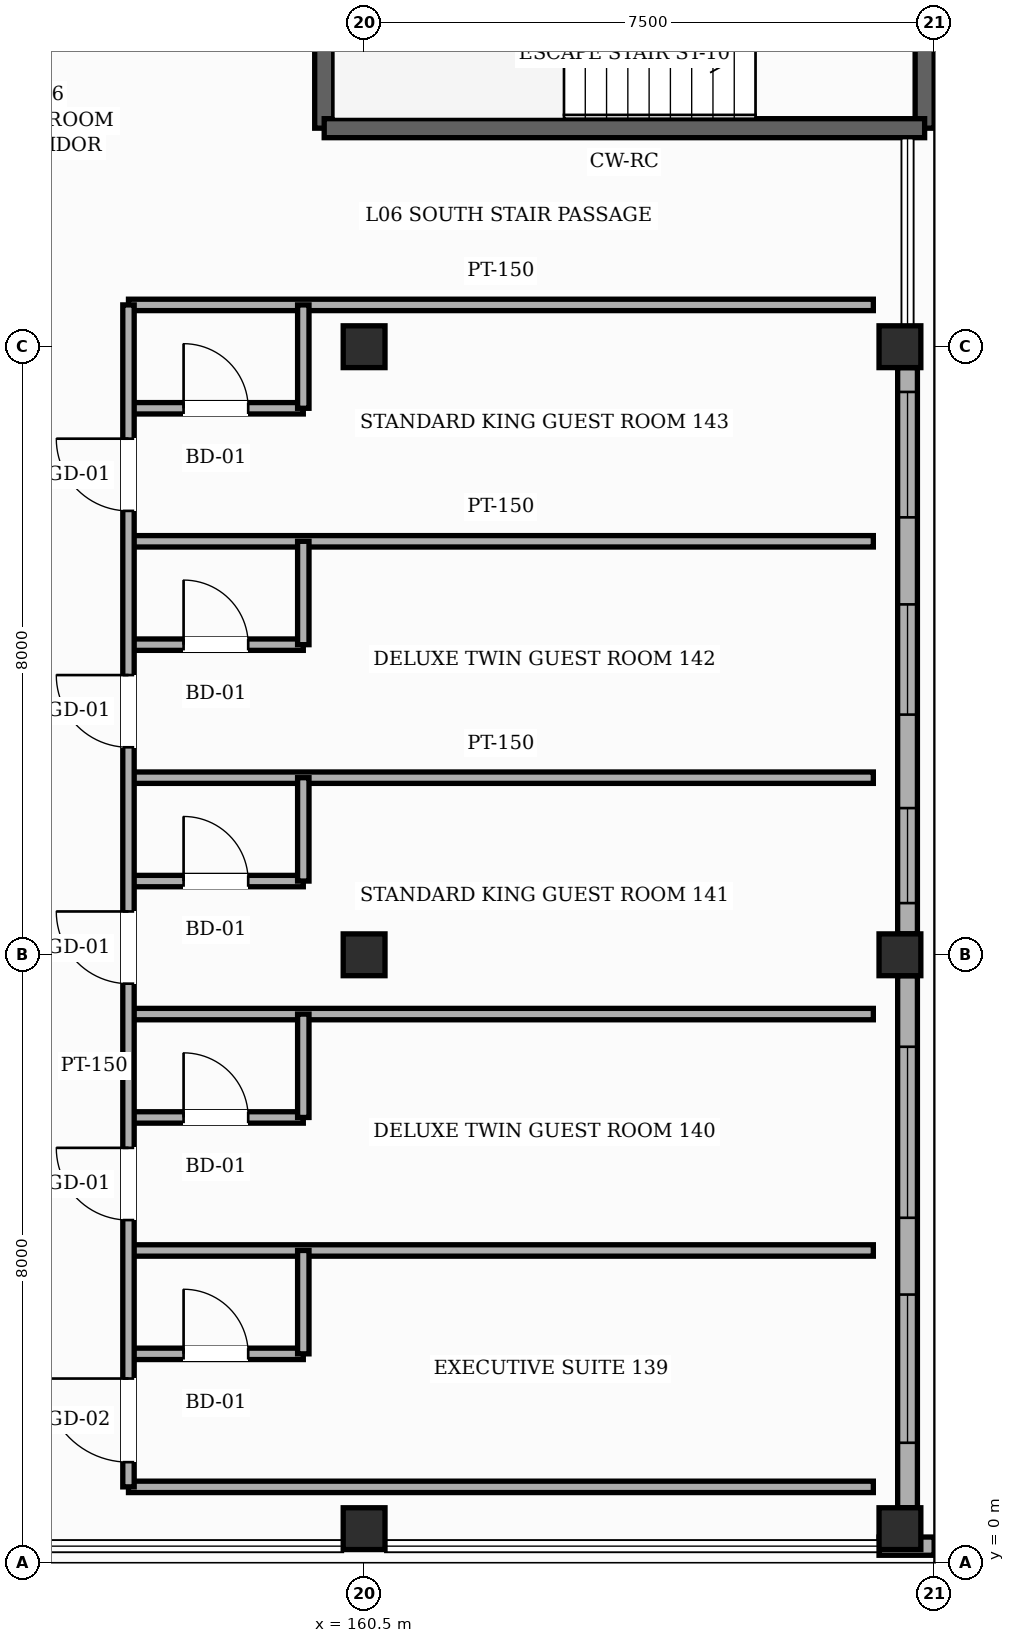
"""IFC4 building model, lengths in metres.
Left out: names, types, materials, properties, quantities, classifications, styles, units other than length and angle.
Written with IfcOpenShell. Run it as: python <this file> out.ifc"""

import sys

from ifc_helpers import new_model, si_unit, direction, frame, frame_2d, origin, origin_2d, place, context, subcontext, project, spatial, rectangle, hollow_rectangle, extrude, element, fill, save


model = new_model("IFC4")
c1 = context("Model", 3, precision=1e-05, world=origin(), true_north=direction((0.0, 1.0)))
c2 = subcontext(c1, "Body", "Model", "MODEL_VIEW")
j1 = project(units=[si_unit("LENGTHUNIT", "METRE"), si_unit("PLANEANGLEUNIT", "RADIAN")], contexts=[c1])
p1 = place(None, origin())
s1 = spatial("IfcSite", under=j1, at=p1, CompositionType="ELEMENT")
p2 = place(p1, origin())
s2 = spatial("IfcBuilding", under=s1, at=p2, CompositionType="ELEMENT")
p3 = place(p2, frame((0.0, 0.0, 28.2)))
s3 = spatial("IfcBuildingStorey", under=s2, at=p3, CompositionType="ELEMENT", Elevation=28.2)
p4 = place(p3, frame((160.5, 0.45, 0.0), z_axis=(0.0, 0.0, 1.0), x_axis=(1.0, 0.0, 0.0)))
e1 = element("IfcColumn", 1, at=p4, inside=s3, PredefinedType="COLUMN", context=c2, shape_type="SweptSolid", body=[
    extrude(hollow_rectangle(XDim=0.55, YDim=0.55, WallThickness=0.022, InnerFilletRadius=0.022, OuterFilletRadius=0.044, at=origin_2d()), origin(), (0.0, 0.0, 1.0), 3.38),
])
for number, where, z_axis, x_axis in (
    (2, (160.5, 8.0, 0.0), (0.0, 0.0, 1.0), (1.0, 0.0, 0.0)),
    (3, (160.5, 16.0, 0.0), (0.0, 0.0, 1.0), (1.0, 0.0, 0.0)),
):
    element("IfcColumn", number, at=place(p3, frame(where, z_axis=z_axis, x_axis=x_axis)), inside=s3, PredefinedType="COLUMN", context=c2, shape_type="SweptSolid", body=[
        extrude(hollow_rectangle(XDim=0.55, YDim=0.55, WallThickness=0.022, InnerFilletRadius=0.022, OuterFilletRadius=0.044, at=origin_2d()), origin(), (0.0, 0.0, 1.0), 3.6),
    ])
p5 = place(p3, frame((167.55, 0.45, 0.0), z_axis=(0.0, 0.0, 1.0), x_axis=(1.0, 0.0, 0.0)))
e4 = element("IfcColumn", 4, at=p5, inside=s3, PredefinedType="COLUMN", context=c2, shape_type="SweptSolid", body=[
    extrude(hollow_rectangle(XDim=0.55, YDim=0.55, WallThickness=0.022, InnerFilletRadius=0.022, OuterFilletRadius=0.044, at=origin_2d()), origin(), (0.0, 0.0, 1.0), 3.38),
])
for number, where, z_axis, x_axis in (
    (5, (167.55, 8.0, 0.0), (0.0, 0.0, 1.0), (1.0, 0.0, 0.0)),
    (6, (167.55, 16.0, 0.0), (0.0, 0.0, 1.0), (1.0, 0.0, 0.0)),
):
    element("IfcColumn", number, at=place(p3, frame(where, z_axis=z_axis, x_axis=x_axis)), inside=s3, PredefinedType="COLUMN", context=c2, shape_type="SweptSolid", body=[
        extrude(hollow_rectangle(XDim=0.55, YDim=0.55, WallThickness=0.022, InnerFilletRadius=0.022, OuterFilletRadius=0.044, at=origin_2d()), origin(), (0.0, 0.0, 1.0), 3.6),
    ])
p6 = place(p3, frame((167.65, 7.725, 0.0), z_axis=(0.0, 0.0, 1.0), x_axis=(0.0, -1.0, 0.0)))
e7 = element("IfcWall", 7, at=p6, inside=s3, PredefinedType="SOLIDWALL", context=c2, shape_type="SweptSolid", body=[
    extrude(rectangle(XDim=7.0, YDim=0.26, at=frame_2d((3.5, 0.0))), origin(), (0.0, 0.0, 1.0), 2.755),
])
p7 = place(p6, frame((4.195, 0.0, 0.85)))
e8 = element("IfcOpeningElement", 8, at=p7, cuts=e7, PredefinedType="OPENING", context=c2, shape_type="SweptSolid", body=[
    extrude(rectangle(XDim=1.95, YDim=1.35, at=frame_2d((0.975, 0.675))), frame((0.0, 0.14, 0.0), z_axis=(0.0, -1.0, 0.0), x_axis=(1.0, 0.0, 0.0)), (0.0, 0.0, 1.0), 0.28),
])
p8 = place(p6, frame((0.935, 0.0, 0.85)))
e9 = element("IfcOpeningElement", 9, at=p8, cuts=e7, PredefinedType="OPENING", context=c2, shape_type="SweptSolid", body=[
    extrude(rectangle(XDim=2.25, YDim=1.35, at=frame_2d((1.125, 0.675))), frame((0.0, 0.14, 0.0), z_axis=(0.0, -1.0, 0.0), x_axis=(1.0, 0.0, 0.0)), (0.0, 0.0, 1.0), 0.28),
])
p9 = place(p3, frame((167.65, 15.725, 0.0), z_axis=(0.0, 0.0, 1.0), x_axis=(0.0, -1.0, 0.0)))
e10 = element("IfcWall", 10, at=p9, inside=s3, PredefinedType="SOLIDWALL", context=c2, shape_type="SweptSolid", body=[
    extrude(rectangle(XDim=7.45, YDim=0.26, at=frame_2d((3.725, 0.0))), origin(), (0.0, 0.0, 1.0), 2.755),
])
p10 = place(p9, frame((5.795, 0.0, 0.85)))
e11 = element("IfcOpeningElement", 11, at=p10, cuts=e10, PredefinedType="OPENING", context=c2, shape_type="SweptSolid", body=[
    extrude(rectangle(XDim=1.25, YDim=1.35, at=frame_2d((0.625, 0.675))), frame((0.0, 0.14, 0.0), z_axis=(0.0, -1.0, 0.0), x_axis=(1.0, 0.0, 0.0)), (0.0, 0.0, 1.0), 0.28),
])
p11 = place(p9, frame((3.115, 0.0, 0.85)))
e12 = element("IfcOpeningElement", 12, at=p11, cuts=e10, PredefinedType="OPENING", context=c2, shape_type="SweptSolid", body=[
    extrude(rectangle(XDim=1.45, YDim=1.35, at=frame_2d((0.725, 0.675))), frame((0.0, 0.14, 0.0), z_axis=(0.0, -1.0, 0.0), x_axis=(1.0, 0.0, 0.0)), (0.0, 0.0, 1.0), 0.28),
])
p12 = place(p9, frame((0.32, 0.0, 0.85)))
e13 = element("IfcOpeningElement", 13, at=p12, cuts=e10, PredefinedType="OPENING", context=c2, shape_type="SweptSolid", body=[
    extrude(rectangle(XDim=1.65, YDim=1.35, at=frame_2d((0.825, 0.675))), frame((0.0, 0.14, 0.0), z_axis=(0.0, -1.0, 0.0), x_axis=(1.0, 0.0, 0.0)), (0.0, 0.0, 1.0), 0.28),
])
p13 = place(p3, frame((168.0, 0.22, 0.0), z_axis=(0.0, 0.0, 1.0), x_axis=(-1.0, 0.0, 0.0)))
e14 = element("IfcWall", 14, at=p13, inside=s3, PredefinedType="SOLIDWALL", context=c2, shape_type="SweptSolid", body=[
    extrude(rectangle(XDim=0.725, YDim=0.24, at=frame_2d((0.363, 0.0))), origin(), (0.0, 0.0, 1.0), 3.365),
])
for number, where, z_axis, x_axis in (
    (15, (167.875, 22.225, 0.0), (0.0, 0.0, 1.0), (0.0, -1.0, 0.0)),
    (16, (159.975, 18.875, 0.0), (0.0, 0.0, 1.0), (0.0, 1.0, 0.0)),
):
    element("IfcWall", number, at=place(p3, frame(where, z_axis=z_axis, x_axis=x_axis)), inside=s3, PredefinedType="SHEAR", context=c2, shape_type="SweptSolid", body=[
        extrude(rectangle(XDim=3.35, YDim=0.25, at=frame_2d((1.675, 0.0))), origin(), (0.0, 0.0, 1.0), 3.38),
    ])
p14 = place(p3, frame((167.875, 18.875, 0.0), z_axis=(0.0, 0.0, 1.0), x_axis=(-1.0, 0.0, 0.0)))
e17 = element("IfcWall", 17, at=p14, inside=s3, PredefinedType="SHEAR", context=c2, shape_type="SweptSolid", body=[
    extrude(rectangle(XDim=7.9, YDim=0.25, at=frame_2d((3.95, 0.0))), origin(), (0.0, 0.0, 1.0), 3.38),
])
p15 = place(p3, frame((157.4, 1.0, 0.0), z_axis=(0.0, 0.0, 1.0), x_axis=(1.0, 0.0, 0.0)))
e18 = element("IfcWall", 18, at=p15, inside=s3, PredefinedType="PARTITIONING", context=c2, shape_type="SweptSolid", body=[
    extrude(rectangle(XDim=9.8, YDim=0.15, at=frame_2d((4.9, 0.0))), origin(), (0.0, 0.0, 1.0), 3.365),
])
p16 = place(p3, frame((157.4, 2.75, 0.0), z_axis=(0.0, 0.0, 1.0), x_axis=(1.0, 0.0, 0.0)))
e19 = element("IfcWall", 19, at=p16, inside=s3, PredefinedType="PARTITIONING", context=c2, shape_type="SweptSolid", body=[
    extrude(rectangle(XDim=2.3, YDim=0.15, at=frame_2d((1.15, 0.0))), origin(), (0.0, 0.0, 1.0), 3.365),
])
p17 = place(p16, frame((0.725, 0.0, 0.0)))
e20 = element("IfcOpeningElement", 20, at=p17, cuts=e19, PredefinedType="OPENING", context=c2, shape_type="SweptSolid", body=[
    extrude(rectangle(XDim=0.85, YDim=2.1, at=frame_2d((0.425, 1.05))), frame((0.0, 0.085, 0.0), z_axis=(0.0, -1.0, 0.0), x_axis=(1.0, 0.0, 0.0)), (0.0, 0.0, 1.0), 0.17),
])
p18 = place(p3, frame((157.4, 4.11, 0.0), z_axis=(0.0, 0.0, 1.0), x_axis=(1.0, 0.0, 0.0)))
e21 = element("IfcWall", 21, at=p18, inside=s3, PredefinedType="PARTITIONING", context=c2, shape_type="SweptSolid", body=[
    extrude(rectangle(XDim=9.8, YDim=0.15, at=frame_2d((4.9, 0.0))), origin(), (0.0, 0.0, 1.0), 3.005),
])
p19 = place(p3, frame((157.4, 5.86, 0.0), z_axis=(0.0, 0.0, 1.0), x_axis=(1.0, 0.0, 0.0)))
e22 = element("IfcWall", 22, at=p19, inside=s3, PredefinedType="PARTITIONING", context=c2, shape_type="SweptSolid", body=[
    extrude(rectangle(XDim=2.3, YDim=0.15, at=frame_2d((1.15, 0.0))), origin(), (0.0, 0.0, 1.0), 3.365),
])
p20 = place(p19, frame((0.725, 0.0, 0.0)))
e23 = element("IfcOpeningElement", 23, at=p20, cuts=e22, PredefinedType="OPENING", context=c2, shape_type="SweptSolid", body=[
    extrude(rectangle(XDim=0.85, YDim=2.1, at=frame_2d((0.425, 1.05))), frame((0.0, 0.085, 0.0), z_axis=(0.0, -1.0, 0.0), x_axis=(1.0, 0.0, 0.0)), (0.0, 0.0, 1.0), 0.17),
])
p21 = place(p3, frame((157.4, 7.22, 0.0), z_axis=(0.0, 0.0, 1.0), x_axis=(1.0, 0.0, 0.0)))
e24 = element("IfcWall", 24, at=p21, inside=s3, PredefinedType="PARTITIONING", context=c2, shape_type="SweptSolid", body=[
    extrude(rectangle(XDim=9.8, YDim=0.15, at=frame_2d((4.9, 0.0))), origin(), (0.0, 0.0, 1.0), 3.365),
])
p22 = place(p3, frame((157.4, 8.97, 0.0), z_axis=(0.0, 0.0, 1.0), x_axis=(1.0, 0.0, 0.0)))
e25 = element("IfcWall", 25, at=p22, inside=s3, PredefinedType="PARTITIONING", context=c2, shape_type="SweptSolid", body=[
    extrude(rectangle(XDim=2.3, YDim=0.15, at=frame_2d((1.15, 0.0))), origin(), (0.0, 0.0, 1.0), 3.365),
])
p23 = place(p22, frame((0.725, 0.0, 0.0)))
e26 = element("IfcOpeningElement", 26, at=p23, cuts=e25, PredefinedType="OPENING", context=c2, shape_type="SweptSolid", body=[
    extrude(rectangle(XDim=0.85, YDim=2.1, at=frame_2d((0.425, 1.05))), frame((0.0, 0.085, 0.0), z_axis=(0.0, -1.0, 0.0), x_axis=(1.0, 0.0, 0.0)), (0.0, 0.0, 1.0), 0.17),
])
p24 = place(p3, frame((157.4, 10.33, 0.0), z_axis=(0.0, 0.0, 1.0), x_axis=(1.0, 0.0, 0.0)))
e27 = element("IfcWall", 27, at=p24, inside=s3, PredefinedType="PARTITIONING", context=c2, shape_type="SweptSolid", body=[
    extrude(rectangle(XDim=9.8, YDim=0.15, at=frame_2d((4.9, 0.0))), origin(), (0.0, 0.0, 1.0), 3.365),
])
p25 = place(p3, frame((157.4, 12.08, 0.0), z_axis=(0.0, 0.0, 1.0), x_axis=(1.0, 0.0, 0.0)))
e28 = element("IfcWall", 28, at=p25, inside=s3, PredefinedType="PARTITIONING", context=c2, shape_type="SweptSolid", body=[
    extrude(rectangle(XDim=2.3, YDim=0.15, at=frame_2d((1.15, 0.0))), origin(), (0.0, 0.0, 1.0), 3.005),
])
p26 = place(p25, frame((0.725, 0.0, 0.0)))
e29 = element("IfcOpeningElement", 29, at=p26, cuts=e28, PredefinedType="OPENING", context=c2, shape_type="SweptSolid", body=[
    extrude(rectangle(XDim=0.85, YDim=2.1, at=frame_2d((0.425, 1.05))), frame((0.0, 0.085, 0.0), z_axis=(0.0, -1.0, 0.0), x_axis=(1.0, 0.0, 0.0)), (0.0, 0.0, 1.0), 0.17),
])
p27 = place(p3, frame((157.4, 13.44, 0.0), z_axis=(0.0, 0.0, 1.0), x_axis=(1.0, 0.0, 0.0)))
e30 = element("IfcWall", 30, at=p27, inside=s3, PredefinedType="PARTITIONING", context=c2, shape_type="SweptSolid", body=[
    extrude(rectangle(XDim=9.8, YDim=0.15, at=frame_2d((4.9, 0.0))), origin(), (0.0, 0.0, 1.0), 3.365),
])
p28 = place(p3, frame((157.4, 15.19, 0.0), z_axis=(0.0, 0.0, 1.0), x_axis=(1.0, 0.0, 0.0)))
e31 = element("IfcWall", 31, at=p28, inside=s3, PredefinedType="PARTITIONING", context=c2, shape_type="SweptSolid", body=[
    extrude(rectangle(XDim=2.3, YDim=0.15, at=frame_2d((1.15, 0.0))), origin(), (0.0, 0.0, 1.0), 3.365),
])
p29 = place(p28, frame((0.725, 0.0, 0.0)))
e32 = element("IfcOpeningElement", 32, at=p29, cuts=e31, PredefinedType="OPENING", context=c2, shape_type="SweptSolid", body=[
    extrude(rectangle(XDim=0.85, YDim=2.1, at=frame_2d((0.425, 1.05))), frame((0.0, 0.085, 0.0), z_axis=(0.0, -1.0, 0.0), x_axis=(1.0, 0.0, 0.0)), (0.0, 0.0, 1.0), 0.17),
])
p30 = place(p3, frame((157.4, 16.55, 0.0), z_axis=(0.0, 0.0, 1.0), x_axis=(1.0, 0.0, 0.0)))
e33 = element("IfcWall", 33, at=p30, inside=s3, PredefinedType="PARTITIONING", context=c2, shape_type="SweptSolid", body=[
    extrude(rectangle(XDim=9.8, YDim=0.15, at=frame_2d((4.9, 0.0))), origin(), (0.0, 0.0, 1.0), 3.365),
])
p31 = place(p3, frame((157.4, 1.0, 0.0), z_axis=(0.0, 0.0, 1.0), x_axis=(0.0, 1.0, 0.0)))
e34 = element("IfcWall", 34, at=p31, inside=s3, PredefinedType="PARTITIONING", context=c2, shape_type="SweptSolid", body=[
    extrude(rectangle(XDim=15.55, YDim=0.15, at=frame_2d((7.775, 0.0))), origin(), (0.0, 0.0, 1.0), 3.365),
])
p32 = place(p31, frame((0.325, 0.0, 0.0)))
e35 = element("IfcOpeningElement", 35, at=p32, cuts=e34, PredefinedType="OPENING", context=c2, shape_type="SweptSolid", body=[
    extrude(rectangle(XDim=1.1, YDim=2.2, at=frame_2d((0.55, 1.1))), frame((0.0, 0.085, 0.0), z_axis=(0.0, -1.0, 0.0), x_axis=(1.0, 0.0, 0.0)), (0.0, 0.0, 1.0), 0.17),
])
p33 = place(p31, frame((3.51, 0.0, 0.0)))
e36 = element("IfcOpeningElement", 36, at=p33, cuts=e34, PredefinedType="OPENING", context=c2, shape_type="SweptSolid", body=[
    extrude(rectangle(XDim=0.95, YDim=2.15, at=frame_2d((0.475, 1.075))), frame((0.0, 0.085, 0.0), z_axis=(0.0, -1.0, 0.0), x_axis=(1.0, 0.0, 0.0)), (0.0, 0.0, 1.0), 0.17),
])
p34 = place(p31, frame((6.62, 0.0, 0.0)))
e37 = element("IfcOpeningElement", 37, at=p34, cuts=e34, PredefinedType="OPENING", context=c2, shape_type="SweptSolid", body=[
    extrude(rectangle(XDim=0.95, YDim=2.15, at=frame_2d((0.475, 1.075))), frame((0.0, 0.085, 0.0), z_axis=(0.0, -1.0, 0.0), x_axis=(1.0, 0.0, 0.0)), (0.0, 0.0, 1.0), 0.17),
])
p35 = place(p31, frame((9.73, 0.0, 0.0)))
e38 = element("IfcOpeningElement", 38, at=p35, cuts=e34, PredefinedType="OPENING", context=c2, shape_type="SweptSolid", body=[
    extrude(rectangle(XDim=0.95, YDim=2.15, at=frame_2d((0.475, 1.075))), frame((0.0, 0.085, 0.0), z_axis=(0.0, -1.0, 0.0), x_axis=(1.0, 0.0, 0.0)), (0.0, 0.0, 1.0), 0.17),
])
p36 = place(p31, frame((12.84, 0.0, 0.0)))
e39 = element("IfcOpeningElement", 39, at=p36, cuts=e34, PredefinedType="OPENING", context=c2, shape_type="SweptSolid", body=[
    extrude(rectangle(XDim=0.95, YDim=2.15, at=frame_2d((0.475, 1.075))), frame((0.0, 0.085, 0.0), z_axis=(0.0, -1.0, 0.0), x_axis=(1.0, 0.0, 0.0)), (0.0, 0.0, 1.0), 0.17),
])
p37 = place(p3, frame((159.7, 2.75, 0.0), z_axis=(0.0, 0.0, 1.0), x_axis=(0.0, 1.0, 0.0)))
e40 = element("IfcWall", 40, at=p37, inside=s3, PredefinedType="PARTITIONING", context=c2, shape_type="SweptSolid", body=[
    extrude(rectangle(XDim=1.36, YDim=0.15, at=frame_2d((0.68, 0.0))), origin(), (0.0, 0.0, 1.0), 3.365),
])
p38 = place(p3, frame((159.7, 5.86, 0.0), z_axis=(0.0, 0.0, 1.0), x_axis=(0.0, 1.0, 0.0)))
e41 = element("IfcWall", 41, at=p38, inside=s3, PredefinedType="PARTITIONING", context=c2, shape_type="SweptSolid", body=[
    extrude(rectangle(XDim=1.36, YDim=0.15, at=frame_2d((0.68, 0.0))), origin(), (0.0, 0.0, 1.0), 3.365),
])
p39 = place(p3, frame((159.7, 8.97, 0.0), z_axis=(0.0, 0.0, 1.0), x_axis=(0.0, 1.0, 0.0)))
e42 = element("IfcWall", 42, at=p39, inside=s3, PredefinedType="PARTITIONING", context=c2, shape_type="SweptSolid", body=[
    extrude(rectangle(XDim=1.36, YDim=0.15, at=frame_2d((0.68, 0.0))), origin(), (0.0, 0.0, 1.0), 3.365),
])
p40 = place(p3, frame((159.7, 12.08, 0.0), z_axis=(0.0, 0.0, 1.0), x_axis=(0.0, 1.0, 0.0)))
e43 = element("IfcWall", 43, at=p40, inside=s3, PredefinedType="PARTITIONING", context=c2, shape_type="SweptSolid", body=[
    extrude(rectangle(XDim=1.36, YDim=0.15, at=frame_2d((0.68, 0.0))), origin(), (0.0, 0.0, 1.0), 3.365),
])
p41 = place(p3, frame((159.7, 15.19, 0.0), z_axis=(0.0, 0.0, 1.0), x_axis=(0.0, 1.0, 0.0)))
e44 = element("IfcWall", 44, at=p41, inside=s3, PredefinedType="PARTITIONING", context=c2, shape_type="SweptSolid", body=[
    extrude(rectangle(XDim=1.36, YDim=0.15, at=frame_2d((0.68, 0.0))), origin(), (0.0, 0.0, 1.0), 3.365),
])
p42 = place(p7, origin())
e45 = element("IfcWindow", 45, at=p42, inside=s3, PartitioningType="SINGLE_PANEL", PredefinedType="WINDOW", context=c2, shape_type="SweptSolid", body=[
    extrude(rectangle(XDim=1.95, YDim=1.35, at=frame_2d((0.975, 0.675))), frame((0.0, 0.03, 0.0), z_axis=(0.0, -1.0, 0.0), x_axis=(1.0, 0.0, 0.0)), (0.0, 0.0, 1.0), 0.06),
])
fill(e8, e45)
p43 = place(p8, origin())
e46 = element("IfcWindow", 46, at=p43, inside=s3, PartitioningType="SINGLE_PANEL", PredefinedType="WINDOW", context=c2, shape_type="SweptSolid", body=[
    extrude(rectangle(XDim=2.25, YDim=1.35, at=frame_2d((1.125, 0.675))), frame((0.0, 0.03, 0.0), z_axis=(0.0, -1.0, 0.0), x_axis=(1.0, 0.0, 0.0)), (0.0, 0.0, 1.0), 0.06),
])
fill(e9, e46)
p44 = place(p10, origin())
e47 = element("IfcWindow", 47, at=p44, inside=s3, PartitioningType="SINGLE_PANEL", PredefinedType="WINDOW", context=c2, shape_type="SweptSolid", body=[
    extrude(rectangle(XDim=1.25, YDim=1.35, at=frame_2d((0.625, 0.675))), frame((0.0, 0.03, 0.0), z_axis=(0.0, -1.0, 0.0), x_axis=(1.0, 0.0, 0.0)), (0.0, 0.0, 1.0), 0.06),
])
fill(e11, e47)
p45 = place(p11, origin())
e48 = element("IfcWindow", 48, at=p45, inside=s3, PartitioningType="SINGLE_PANEL", PredefinedType="WINDOW", context=c2, shape_type="SweptSolid", body=[
    extrude(rectangle(XDim=1.45, YDim=1.35, at=frame_2d((0.725, 0.675))), frame((0.0, 0.03, 0.0), z_axis=(0.0, -1.0, 0.0), x_axis=(1.0, 0.0, 0.0)), (0.0, 0.0, 1.0), 0.06),
])
fill(e12, e48)
p46 = place(p12, origin())
e49 = element("IfcWindow", 49, at=p46, inside=s3, PartitioningType="SINGLE_PANEL", PredefinedType="WINDOW", context=c2, shape_type="SweptSolid", body=[
    extrude(rectangle(XDim=1.65, YDim=1.35, at=frame_2d((0.825, 0.675))), frame((0.0, 0.03, 0.0), z_axis=(0.0, -1.0, 0.0), x_axis=(1.0, 0.0, 0.0)), (0.0, 0.0, 1.0), 0.06),
])
fill(e13, e49)
p47 = place(p32, origin())
e50 = element("IfcDoor", 50, at=p47, inside=s3, OperationType="SINGLE_SWING_RIGHT", PredefinedType="DOOR", context=c2, shape_type="SweptSolid", body=[
    extrude(rectangle(XDim=1.1, YDim=2.2, at=frame_2d((0.55, 1.1))), frame((0.0, 0.025, 0.0), z_axis=(0.0, -1.0, 0.0), x_axis=(1.0, 0.0, 0.0)), (0.0, 0.0, 1.0), 0.05),
])
fill(e35, e50)
p48 = place(p17, origin())
e51 = element("IfcDoor", 51, at=p48, inside=s3, OperationType="SINGLE_SWING_LEFT", PredefinedType="DOOR", context=c2, shape_type="SweptSolid", body=[
    extrude(rectangle(XDim=0.85, YDim=2.1, at=frame_2d((0.425, 1.05))), frame((0.0, 0.025, 0.0), z_axis=(0.0, -1.0, 0.0), x_axis=(1.0, 0.0, 0.0)), (0.0, 0.0, 1.0), 0.05),
])
fill(e20, e51)
p49 = place(p33, origin())
e52 = element("IfcDoor", 52, at=p49, inside=s3, OperationType="SINGLE_SWING_RIGHT", PredefinedType="DOOR", context=c2, shape_type="SweptSolid", body=[
    extrude(rectangle(XDim=0.95, YDim=2.15, at=frame_2d((0.475, 1.075))), frame((0.0, 0.025, 0.0), z_axis=(0.0, -1.0, 0.0), x_axis=(1.0, 0.0, 0.0)), (0.0, 0.0, 1.0), 0.05),
])
fill(e36, e52)
p50 = place(p20, origin())
e53 = element("IfcDoor", 53, at=p50, inside=s3, OperationType="SINGLE_SWING_LEFT", PredefinedType="DOOR", context=c2, shape_type="SweptSolid", body=[
    extrude(rectangle(XDim=0.85, YDim=2.1, at=frame_2d((0.425, 1.05))), frame((0.0, 0.025, 0.0), z_axis=(0.0, -1.0, 0.0), x_axis=(1.0, 0.0, 0.0)), (0.0, 0.0, 1.0), 0.05),
])
fill(e23, e53)
p51 = place(p34, origin())
e54 = element("IfcDoor", 54, at=p51, inside=s3, OperationType="SINGLE_SWING_RIGHT", PredefinedType="DOOR", context=c2, shape_type="SweptSolid", body=[
    extrude(rectangle(XDim=0.95, YDim=2.15, at=frame_2d((0.475, 1.075))), frame((0.0, 0.025, 0.0), z_axis=(0.0, -1.0, 0.0), x_axis=(1.0, 0.0, 0.0)), (0.0, 0.0, 1.0), 0.05),
])
fill(e37, e54)
p52 = place(p23, origin())
e55 = element("IfcDoor", 55, at=p52, inside=s3, OperationType="SINGLE_SWING_LEFT", PredefinedType="DOOR", context=c2, shape_type="SweptSolid", body=[
    extrude(rectangle(XDim=0.85, YDim=2.1, at=frame_2d((0.425, 1.05))), frame((0.0, 0.025, 0.0), z_axis=(0.0, -1.0, 0.0), x_axis=(1.0, 0.0, 0.0)), (0.0, 0.0, 1.0), 0.05),
])
fill(e26, e55)
p53 = place(p35, origin())
e56 = element("IfcDoor", 56, at=p53, inside=s3, OperationType="SINGLE_SWING_RIGHT", PredefinedType="DOOR", context=c2, shape_type="SweptSolid", body=[
    extrude(rectangle(XDim=0.95, YDim=2.15, at=frame_2d((0.475, 1.075))), frame((0.0, 0.025, 0.0), z_axis=(0.0, -1.0, 0.0), x_axis=(1.0, 0.0, 0.0)), (0.0, 0.0, 1.0), 0.05),
])
fill(e38, e56)
p54 = place(p26, origin())
e57 = element("IfcDoor", 57, at=p54, inside=s3, OperationType="SINGLE_SWING_LEFT", PredefinedType="DOOR", context=c2, shape_type="SweptSolid", body=[
    extrude(rectangle(XDim=0.85, YDim=2.1, at=frame_2d((0.425, 1.05))), frame((0.0, 0.025, 0.0), z_axis=(0.0, -1.0, 0.0), x_axis=(1.0, 0.0, 0.0)), (0.0, 0.0, 1.0), 0.05),
])
fill(e29, e57)
p55 = place(p36, origin())
e58 = element("IfcDoor", 58, at=p55, inside=s3, OperationType="SINGLE_SWING_RIGHT", PredefinedType="DOOR", context=c2, shape_type="SweptSolid", body=[
    extrude(rectangle(XDim=0.95, YDim=2.15, at=frame_2d((0.475, 1.075))), frame((0.0, 0.025, 0.0), z_axis=(0.0, -1.0, 0.0), x_axis=(1.0, 0.0, 0.0)), (0.0, 0.0, 1.0), 0.05),
])
fill(e39, e58)
p56 = place(p29, origin())
e59 = element("IfcDoor", 59, at=p56, inside=s3, OperationType="SINGLE_SWING_LEFT", PredefinedType="DOOR", context=c2, shape_type="SweptSolid", body=[
    extrude(rectangle(XDim=0.85, YDim=2.1, at=frame_2d((0.425, 1.05))), frame((0.0, 0.025, 0.0), z_axis=(0.0, -1.0, 0.0), x_axis=(1.0, 0.0, 0.0)), (0.0, 0.0, 1.0), 0.05),
])
fill(e32, e59)
save(model, sys.argv[1])
